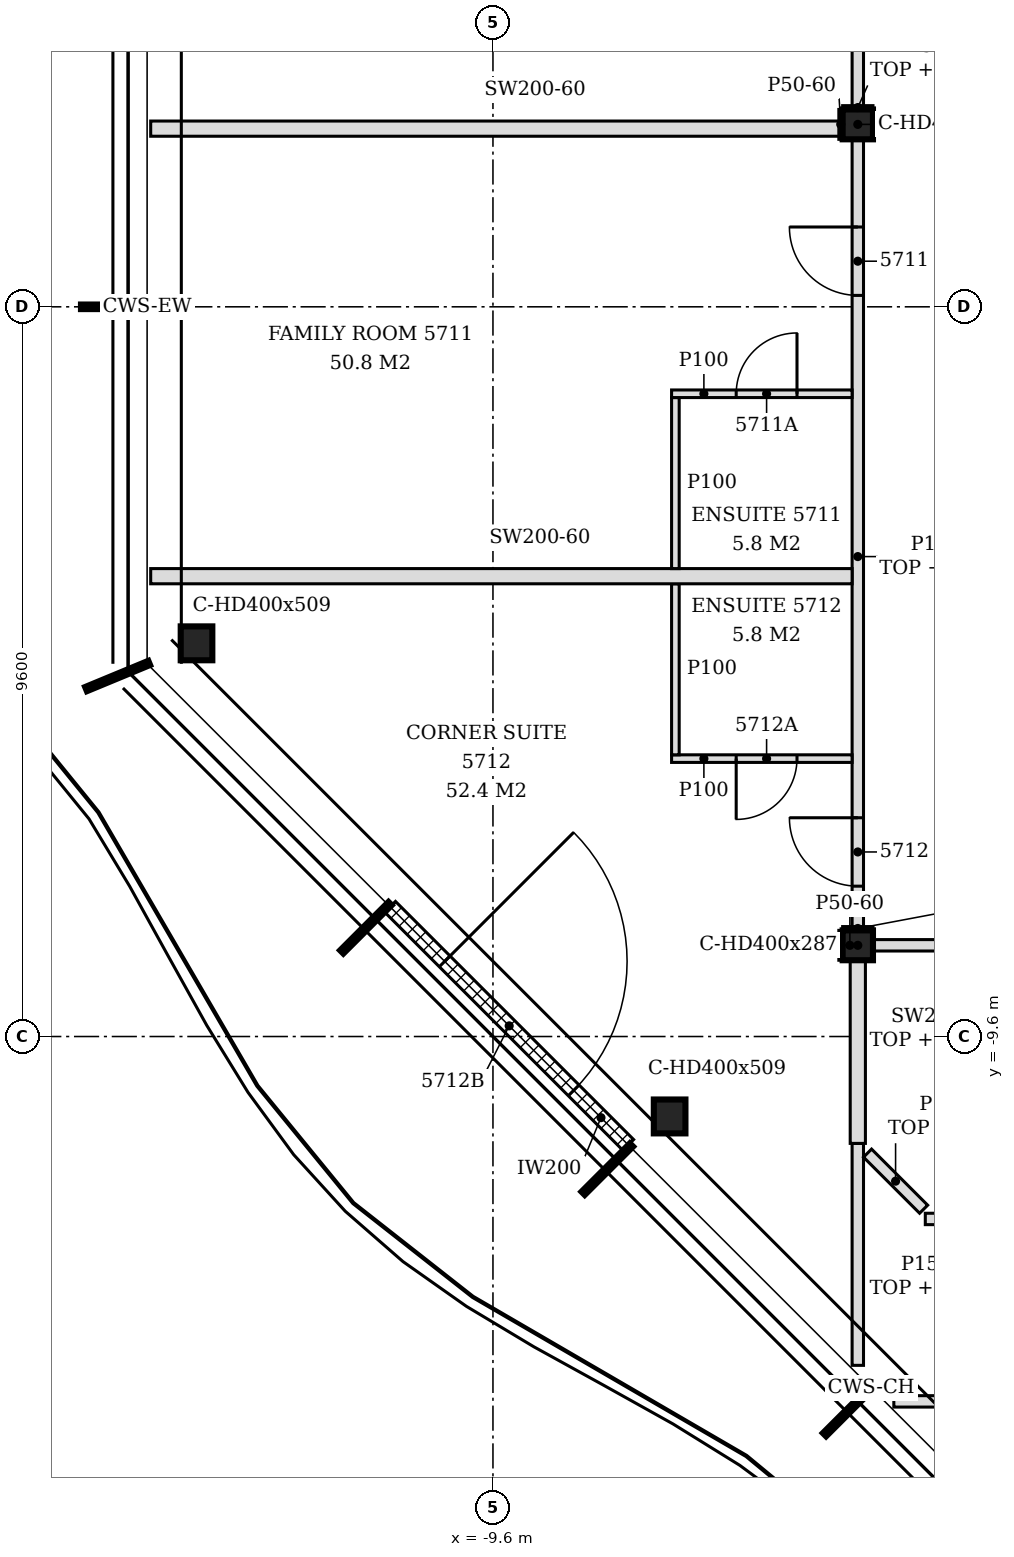
"""IFC4 building model, lengths in metres.
Left out: names, types, materials, properties, quantities, classifications, styles, units other than length and angle.
Written with IfcOpenShell. Run it as: python <this file> out.ifc"""

import sys

from ifc_helpers import new_model, si_unit, direction, frame, frame_2d, origin, origin_2d, place, context, subcontext, project, spatial, polyline, rectangle, i_section, outline, extrude, element, fill, save


model = new_model("IFC4")
c1 = context("Model", 3, precision=1e-05, world=origin(), true_north=direction((0.0, 1.0)))
c2 = subcontext(c1, "Body", "Model", "MODEL_VIEW")
j1 = project(units=[si_unit("LENGTHUNIT", "METRE"), si_unit("PLANEANGLEUNIT", "RADIAN")], contexts=[c1])
p1 = place(None, origin())
s1 = spatial("IfcSite", under=j1, at=p1, CompositionType="ELEMENT")
p2 = place(p1, origin())
s2 = spatial("IfcBuilding", under=s1, at=p2, CompositionType="ELEMENT")
p3 = place(p2, frame((0.0, 0.0, 225.0)))
s3 = spatial("IfcBuildingStorey", under=s2, at=p3, CompositionType="ELEMENT", Elevation=225.0)
for number, where, z_axis, x_axis in (
    (1, (-13.5, -4.427, -0.15), (0.0, 0.0, 1.0), (1.0, 0.0, 0.0)),
    (2, (-7.276, -10.652, -0.15), (0.0, 0.0, 1.0), (1.0, 0.0, 0.0)),
):
    element("IfcColumn", number, at=place(p3, frame(where, z_axis=z_axis, x_axis=x_axis)), inside=s3, PredefinedType="COLUMN", context=c2, shape_type="SweptSolid", body=[
        extrude(i_section(OverallWidth=0.416, OverallDepth=0.446, WebThickness=0.039, FlangeThickness=0.063, FilletRadius=0.015, at=origin_2d()), origin(), (0.0, 0.0, 1.0), 3.6),
    ])
for number, where, z_axis, x_axis in (
    (3, (-4.8, -8.4, -0.15), (0.0, 0.0, 1.0), (1.0, 0.0, 0.0)),
    (4, (-4.8, 2.4, -0.15), (0.0, 0.0, 1.0), (1.0, 0.0, 0.0)),
):
    element("IfcColumn", number, at=place(p3, frame(where, z_axis=z_axis, x_axis=x_axis)), inside=s3, PredefinedType="COLUMN", context=c2, shape_type="SweptSolid", body=[
        extrude(i_section(OverallWidth=0.399, OverallDepth=0.393, WebThickness=0.023, FlangeThickness=0.037, FilletRadius=0.015, at=origin_2d()), origin(), (0.0, 0.0, 1.0), 3.6),
    ])
p4 = place(p3, frame((-10.953, -7.893, 0.0), z_axis=(0.0, 0.0, 1.0), x_axis=(0.707106781187, -0.707106781187, 0.0)))
e5 = element("IfcWall", 5, at=p4, inside=s3, PredefinedType="NOTDEFINED", context=c2, shape_type="SweptSolid", body=[
    extrude(rectangle(XDim=4.431, YDim=0.2, at=frame_2d((2.215, 0.0))), origin(), (0.0, 0.0, 1.0), 3.45),
])
p5 = place(p4, frame((1.015, 0.0, 0.0)))
e6 = element("IfcOpeningElement", 6, at=p5, cuts=e5, PredefinedType="OPENING", context=c2, shape_type="SweptSolid", body=[
    extrude(rectangle(XDim=2.4, YDim=2.4, at=frame_2d((1.2, 1.2))), frame((0.0, 0.11, 0.0), z_axis=(0.0, -1.0, 0.0), x_axis=(1.0, 0.0, 0.0)), (0.0, 0.0, 1.0), 0.22),
])
p6 = place(p3, frame((-4.326, -14.4, 0.0), z_axis=(0.0, 0.0, 1.0), x_axis=(1.0, 0.0, 0.0)))
e7 = element("IfcWall", 7, at=p6, inside=s3, PredefinedType="PARTITIONING", context=c2, shape_type="SweptSolid", body=[
    extrude(outline(polyline([(0.0, 0.0), (21.026, 0.0), (21.026, 2.88), (11.676, 2.88), (11.674, 2.73), (11.376, 2.73), (11.374, 2.88), (1.369, 2.88), (1.367, 2.63), (0.229, 2.63), (0.227, 2.88), (0.0, 2.88), (0.0, 0.0)])), frame((0.0, 0.075, 0.0), z_axis=(0.0, -1.0, 0.0), x_axis=(1.0, 0.0, 0.0)), (0.0, 0.0, 1.0), 0.15),
])
p7 = place(p6, frame((5.169, 0.0, 0.0)))
e8 = element("IfcOpeningElement", 8, at=p7, cuts=e7, PredefinedType="OPENING", context=c2, shape_type="SweptSolid", body=[
    extrude(rectangle(XDim=0.9, YDim=2.1, at=frame_2d((0.45, 1.05))), frame((0.0, 0.085, 0.0), z_axis=(0.0, -1.0, 0.0), x_axis=(1.0, 0.0, 0.0)), (0.0, 0.0, 1.0), 0.17),
])
p8 = place(p6, frame((15.969, 0.0, 0.0)))
e9 = element("IfcOpeningElement", 9, at=p8, cuts=e7, PredefinedType="OPENING", context=c2, shape_type="SweptSolid", body=[
    extrude(rectangle(XDim=0.9, YDim=2.1, at=frame_2d((0.45, 1.05))), frame((0.0, 0.085, 0.0), z_axis=(0.0, -1.0, 0.0), x_axis=(1.0, 0.0, 0.0)), (0.0, 0.0, 1.0), 0.17),
])
p9 = place(p3, frame((-4.8, -13.926, 0.0), z_axis=(0.0, 0.0, 1.0), x_axis=(0.0, 1.0, 0.0)))
e10 = element("IfcWall", 10, at=p9, inside=s3, PredefinedType="PARTITIONING", context=c2, shape_type="SweptSolid", body=[
    extrude(outline(polyline([(0.0, 0.0), (2.92, 0.0), (2.92, 3.03), (1.369, 3.03), (1.367, 2.63), (0.229, 2.63), (0.227, 3.03), (0.0, 3.03), (0.0, 0.0)])), frame((0.0, 0.075, 0.0), z_axis=(0.0, -1.0, 0.0), x_axis=(1.0, 0.0, 0.0)), (0.0, 0.0, 1.0), 0.15),
])
p10 = place(p3, frame((-3.912, -12.0, 0.0), z_axis=(0.0, 0.0, 1.0), x_axis=(1.0, 0.0, 0.0)))
e11 = element("IfcWall", 11, at=p10, inside=s3, PredefinedType="PARTITIONING", context=c2, shape_type="SweptSolid", body=[
    extrude(rectangle(XDim=8.787, YDim=0.15, at=frame_2d((4.394, 0.0))), origin(), (0.0, 0.0, 1.0), 3.45),
])
p11 = place(p3, frame((-3.934, -11.872, 0.0), z_axis=(0.0, 0.0, 1.0), x_axis=(-0.707106781187, 0.707106781187, 0.0)))
e12 = element("IfcWall", 12, at=p11, inside=s3, PredefinedType="PARTITIONING", context=c2, shape_type="SweptSolid", body=[
    extrude(rectangle(XDim=1.044, YDim=0.15, at=frame_2d((0.522, 0.0))), origin(), (0.0, 0.0, 1.0), 3.03),
])
p12 = place(p3, frame((-4.8, -11.006, 0.0), z_axis=(0.0, 0.0, 1.0), x_axis=(0.0, 1.0, 0.0)))
e13 = element("IfcWall", 13, at=p12, inside=s3, PredefinedType="PARTITIONING", context=c2, shape_type="SweptSolid", body=[
    extrude(rectangle(XDim=2.41, YDim=0.2, at=frame_2d((1.205, 0.0))), origin(), (0.0, 0.0, 1.0), 3.03),
])
p13 = place(p3, frame((-4.601, -8.4, 0.0), z_axis=(0.0, 0.0, 1.0), x_axis=(1.0, 0.0, 0.0)))
e14 = element("IfcWall", 14, at=p13, inside=s3, PredefinedType="PARTITIONING", context=c2, shape_type="SweptSolid", body=[
    extrude(rectangle(XDim=9.476, YDim=0.15, at=frame_2d((4.738, 0.0))), origin(), (0.0, 0.0, 1.0), 2.83),
])
p14 = place(p13, frame((4.15, 0.0, 0.0)))
e15 = element("IfcOpeningElement", 15, at=p14, cuts=e14, PredefinedType="OPENING", context=c2, shape_type="SweptSolid", body=[
    extrude(rectangle(XDim=0.9, YDim=2.1, at=frame_2d((0.45, 1.05))), frame((0.0, 0.085, 0.0), z_axis=(0.0, -1.0, 0.0), x_axis=(1.0, 0.0, 0.0)), (0.0, 0.0, 1.0), 0.17),
])
p15 = place(p3, frame((-4.8, -8.204, 0.0), z_axis=(0.0, 0.0, 1.0), x_axis=(0.0, 1.0, 0.0)))
e16 = element("IfcWall", 16, at=p15, inside=s3, PredefinedType="PARTITIONING", context=c2, shape_type="SweptSolid", body=[
    extrude(rectangle(XDim=10.407, YDim=0.15, at=frame_2d((5.204, 0.0))), origin(), (0.0, 0.0, 1.0), 2.83),
])
p16 = place(p15, frame((8.354, 0.0, 0.0)))
e17 = element("IfcOpeningElement", 17, at=p16, cuts=e16, PredefinedType="OPENING", context=c2, shape_type="SweptSolid", body=[
    extrude(rectangle(XDim=0.9, YDim=2.1, at=frame_2d((0.45, 1.05))), frame((0.0, 0.085, 0.0), z_axis=(0.0, -1.0, 0.0), x_axis=(1.0, 0.0, 0.0)), (0.0, 0.0, 1.0), 0.17),
])
p17 = place(p15, frame((0.582, 0.0, 0.0)))
e18 = element("IfcOpeningElement", 18, at=p17, cuts=e16, PredefinedType="OPENING", context=c2, shape_type="SweptSolid", body=[
    extrude(rectangle(XDim=0.9, YDim=2.1, at=frame_2d((0.45, 1.05))), frame((0.0, 0.085, 0.0), z_axis=(0.0, -1.0, 0.0), x_axis=(1.0, 0.0, 0.0)), (0.0, 0.0, 1.0), 0.17),
])
p18 = place(p3, frame((-7.25, -5.944, 0.0), z_axis=(0.0, 0.0, 1.0), x_axis=(1.0, 0.0, 0.0)))
e19 = element("IfcWall", 19, at=p18, inside=s3, PredefinedType="PARTITIONING", context=c2, shape_type="SweptSolid", body=[
    extrude(outline(polyline([(0.0, 0.0), (2.375, 0.0), (2.375, 2.83), (2.3, 2.83), (2.298, 3.45), (0.0, 3.45), (0.0, 0.0)])), frame((0.0, 0.05, 0.0), z_axis=(0.0, -1.0, 0.0), x_axis=(1.0, 0.0, 0.0)), (0.0, 0.0, 1.0), 0.1),
])
p19 = place(p18, frame((0.85, 0.0, 0.0)))
e20 = element("IfcOpeningElement", 20, at=p19, cuts=e19, PredefinedType="OPENING", context=c2, shape_type="SweptSolid", body=[
    extrude(rectangle(XDim=0.8, YDim=2.1, at=frame_2d((0.4, 1.05))), frame((0.0, 0.06, 0.0), z_axis=(0.0, -1.0, 0.0), x_axis=(1.0, 0.0, 0.0)), (0.0, 0.0, 1.0), 0.12),
])
p20 = place(p3, frame((-7.2, -5.894, 0.0), z_axis=(0.0, 0.0, 1.0), x_axis=(0.0, 1.0, 0.0)))
e21 = element("IfcWall", 21, at=p20, inside=s3, PredefinedType="PARTITIONING", context=c2, shape_type="SweptSolid", body=[
    extrude(outline(polyline([(0.0, 0.0), (2.25, 0.0), (2.25, 3.45), (1.189, 3.45), (1.187, 2.98), (0.999, 2.98), (0.997, 3.45), (0.0, 3.45), (0.0, 0.0)])), frame((0.0, 0.05, 0.0), z_axis=(0.0, -1.0, 0.0), x_axis=(1.0, 0.0, 0.0)), (0.0, 0.0, 1.0), 0.1),
])
p21 = place(p3, frame((-14.103, -3.544, 0.0), z_axis=(0.0, 0.0, 1.0), x_axis=(1.0, 0.0, 0.0)))
e22 = element("IfcWall", 22, at=p21, inside=s3, PredefinedType="PARTITIONING", context=c2, shape_type="SweptSolid", body=[
    extrude(outline(polyline([(0.0, 0.0), (9.228, 0.0), (9.228, 2.83), (9.153, 2.83), (9.151, 3.45), (0.753, 3.45), (0.751, 2.93), (0.453, 2.93), (0.451, 3.45), (0.0, 3.45), (0.0, 0.0)])), frame((0.0, 0.1, 0.0), z_axis=(0.0, -1.0, 0.0), x_axis=(1.0, 0.0, 0.0)), (0.0, 0.0, 1.0), 0.2),
])
p22 = place(p3, frame((-7.2, -3.444, 0.0), z_axis=(0.0, 0.0, 1.0), x_axis=(0.0, 1.0, 0.0)))
e23 = element("IfcWall", 23, at=p22, inside=s3, PredefinedType="PARTITIONING", context=c2, shape_type="SweptSolid", body=[
    extrude(rectangle(XDim=2.25, YDim=0.1, at=frame_2d((1.125, 0.0))), origin(), (0.0, 0.0, 1.0), 3.45),
])
p23 = place(p3, frame((-7.25, -1.144, 0.0), z_axis=(0.0, 0.0, 1.0), x_axis=(1.0, 0.0, 0.0)))
e24 = element("IfcWall", 24, at=p23, inside=s3, PredefinedType="PARTITIONING", context=c2, shape_type="SweptSolid", body=[
    extrude(outline(polyline([(0.0, 0.0), (2.375, 0.0), (2.375, 2.83), (2.3, 2.83), (2.298, 3.45), (0.0, 3.45), (0.0, 0.0)])), frame((0.0, 0.05, 0.0), z_axis=(0.0, -1.0, 0.0), x_axis=(1.0, 0.0, 0.0)), (0.0, 0.0, 1.0), 0.1),
])
p24 = place(p23, frame((0.85, 0.0, 0.0)))
e25 = element("IfcOpeningElement", 25, at=p24, cuts=e24, PredefinedType="OPENING", context=c2, shape_type="SweptSolid", body=[
    extrude(rectangle(XDim=0.8, YDim=2.1, at=frame_2d((0.4, 1.05))), frame((0.0, 0.06, 0.0), z_axis=(0.0, -1.0, 0.0), x_axis=(1.0, 0.0, 0.0)), (0.0, 0.0, 1.0), 0.12),
])
p25 = place(p3, frame((-14.103, 2.344, 0.0), z_axis=(0.0, 0.0, 1.0), x_axis=(1.0, 0.0, 0.0)))
e26 = element("IfcWall", 26, at=p25, inside=s3, PredefinedType="PARTITIONING", context=c2, shape_type="SweptSolid", body=[
    extrude(outline(polyline([(0.0, 0.0), (9.104, 0.0), (9.104, 3.45), (0.753, 3.45), (0.751, 2.93), (0.453, 2.93), (0.451, 3.45), (0.0, 3.45), (0.0, 0.0)])), frame((0.0, 0.1, 0.0), z_axis=(0.0, -1.0, 0.0), x_axis=(1.0, 0.0, 0.0)), (0.0, 0.0, 1.0), 0.2),
])
p26 = place(p3, frame((-4.8, 2.596, 0.0), z_axis=(0.0, 0.0, 1.0), x_axis=(0.0, 1.0, 0.0)))
e27 = element("IfcWall", 27, at=p26, inside=s3, PredefinedType="PARTITIONING", context=c2, shape_type="SweptSolid", body=[
    extrude(outline(polyline([(0.0, 0.0), (10.407, 0.0), (10.407, 2.63), (9.961, 2.63), (9.959, 2.83), (0.0, 2.83), (0.0, 0.0)])), frame((0.0, 0.075, 0.0), z_axis=(0.0, -1.0, 0.0), x_axis=(1.0, 0.0, 0.0)), (0.0, 0.0, 1.0), 0.15),
])
for number, where, z_axis, x_axis in (
    (28, (-5.024, -8.596, 0.0), (0.0, 0.0, 1.0), (0.0, 1.0, 0.0)),
    (29, (-5.024, 2.204, 0.0), (0.0, 0.0, 1.0), (0.0, 1.0, 0.0)),
):
    element("IfcWall", number, at=place(p3, frame(where, z_axis=z_axis, x_axis=x_axis)), inside=s3, PredefinedType="PARTITIONING", context=c2, shape_type="SweptSolid", body=[
        extrude(rectangle(XDim=0.393, YDim=0.05, at=frame_2d((0.196, 0.0))), origin(), (0.0, 0.0, 1.0), 3.45),
    ])
for number, where, z_axis, x_axis in (
    (30, (-5.0, -8.178, 0.0), (0.0, 0.0, 1.0), (1.0, 0.0, 0.0)),
    (31, (-5.0, 2.622, 0.0), (0.0, 0.0, 1.0), (1.0, 0.0, 0.0)),
):
    element("IfcWall", number, at=place(p3, frame(where, z_axis=z_axis, x_axis=x_axis)), inside=s3, PredefinedType="PARTITIONING", context=c2, shape_type="SweptSolid", body=[
        extrude(rectangle(XDim=0.399, YDim=0.05, at=frame_2d((0.199, 0.0))), origin(), (0.0, 0.0, 1.0), 2.83),
    ])
p27 = place(p5, origin())
e32 = element("IfcDoor", 32, at=p27, inside=s3, OperationType="SINGLE_SWING_LEFT", PredefinedType="DOOR", context=c2, shape_type="SweptSolid", body=[
    extrude(rectangle(XDim=2.4, YDim=2.4, at=frame_2d((1.2, 1.2))), frame((0.0, 0.025, 0.0), z_axis=(0.0, -1.0, 0.0), x_axis=(1.0, 0.0, 0.0)), (0.0, 0.0, 1.0), 0.05),
])
fill(e6, e32)
p28 = place(p16, origin())
e33 = element("IfcDoor", 33, at=p28, inside=s3, OperationType="SINGLE_SWING_RIGHT", PredefinedType="DOOR", context=c2, shape_type="SweptSolid", body=[
    extrude(rectangle(XDim=0.9, YDim=2.1, at=frame_2d((0.45, 1.05))), frame((0.0, 0.025, 0.0), z_axis=(0.0, -1.0, 0.0), x_axis=(1.0, 0.0, 0.0)), (0.0, 0.0, 1.0), 0.05),
])
fill(e17, e33)
p29 = place(p24, origin())
e34 = element("IfcDoor", 34, at=p29, inside=s3, OperationType="SINGLE_SWING_RIGHT", PredefinedType="DOOR", context=c2, shape_type="SweptSolid", body=[
    extrude(rectangle(XDim=0.8, YDim=2.1, at=frame_2d((0.4, 1.05))), frame((0.0, 0.025, 0.0), z_axis=(0.0, -1.0, 0.0), x_axis=(1.0, 0.0, 0.0)), (0.0, 0.0, 1.0), 0.05),
])
fill(e25, e34)
p30 = place(p17, origin())
e35 = element("IfcDoor", 35, at=p30, inside=s3, OperationType="SINGLE_SWING_RIGHT", PredefinedType="DOOR", context=c2, shape_type="SweptSolid", body=[
    extrude(rectangle(XDim=0.9, YDim=2.1, at=frame_2d((0.45, 1.05))), frame((0.0, 0.025, 0.0), z_axis=(0.0, -1.0, 0.0), x_axis=(1.0, 0.0, 0.0)), (0.0, 0.0, 1.0), 0.05),
])
fill(e18, e35)
p31 = place(p19, frame((0.8, 0.0, 0.0), z_axis=(0.0, 0.0, 1.0), x_axis=(-1.0, 0.0, 0.0)))
e36 = element("IfcDoor", 36, at=p31, inside=s3, OperationType="SINGLE_SWING_RIGHT", PredefinedType="DOOR", context=c2, shape_type="SweptSolid", body=[
    extrude(rectangle(XDim=0.8, YDim=2.1, at=frame_2d((0.4, 1.05))), frame((0.0, 0.025, 0.0), z_axis=(0.0, -1.0, 0.0), x_axis=(1.0, 0.0, 0.0)), (0.0, 0.0, 1.0), 0.05),
])
fill(e20, e36)
save(model, sys.argv[1])
